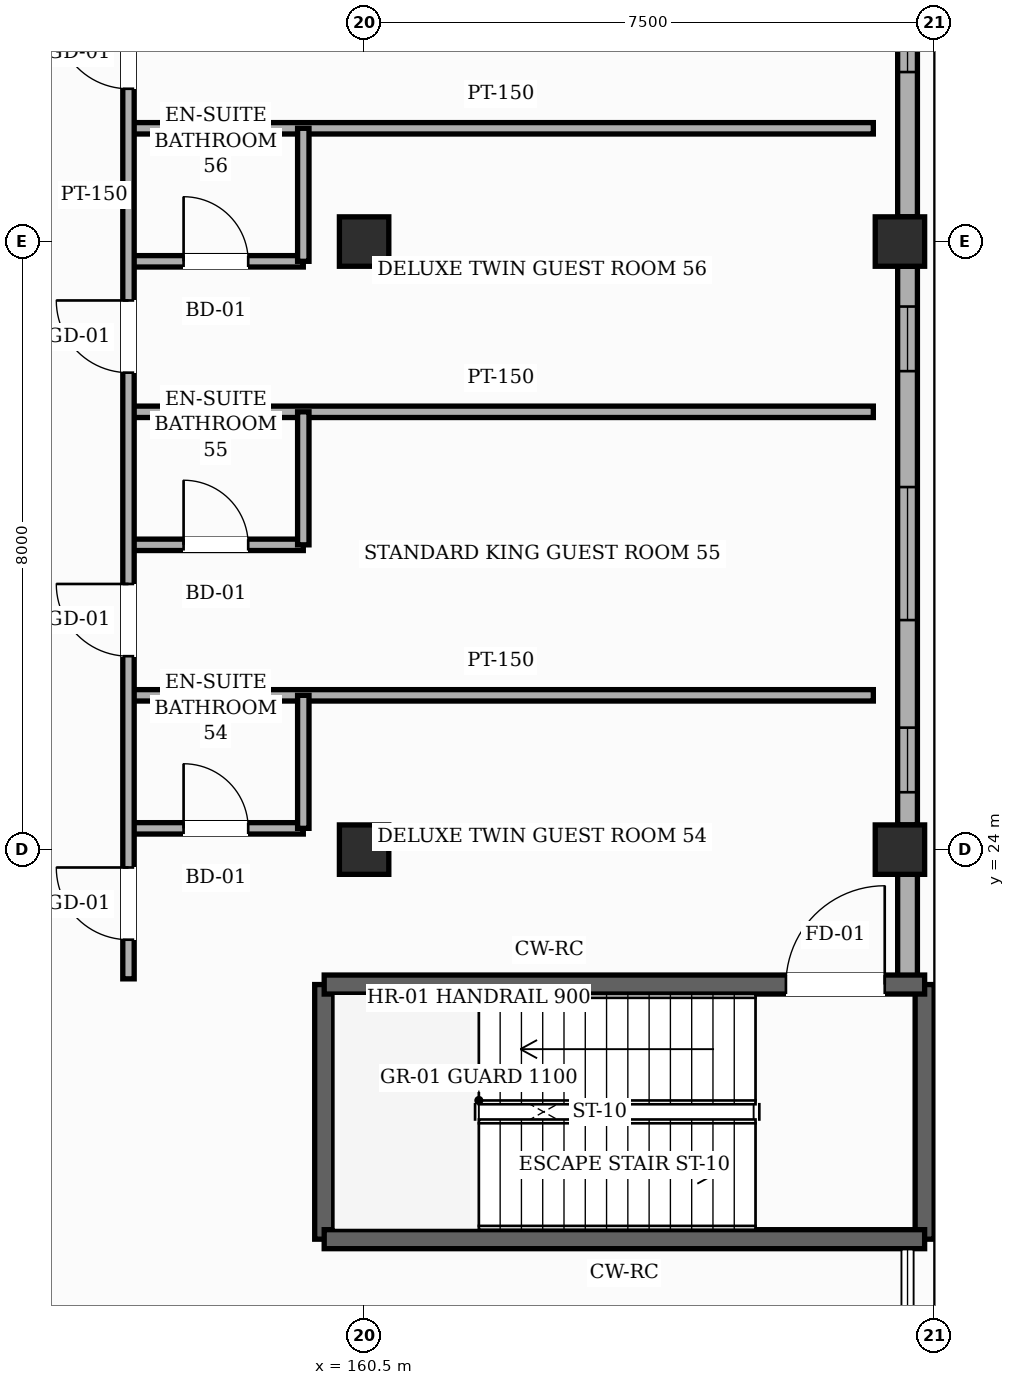
"""IFC4 building model, lengths in metres.
Left out: names, types, materials, properties, quantities, classifications, styles, units other than length and angle.
Written with IfcOpenShell. Run it as: python <this file> out.ifc"""

import sys

from ifc_helpers import new_model, si_unit, direction, frame, frame_2d, origin, origin_2d, place, context, subcontext, project, spatial, rectangle, hollow_rectangle, extrude, element, fill, save


model = new_model("IFC4")
c1 = context("Model", 3, precision=1e-05, world=origin(), true_north=direction((0.0, 1.0)))
c2 = subcontext(c1, "Body", "Model", "MODEL_VIEW")
j1 = project(units=[si_unit("LENGTHUNIT", "METRE"), si_unit("PLANEANGLEUNIT", "RADIAN")], contexts=[c1])
p1 = place(None, origin())
s1 = spatial("IfcSite", under=j1, at=p1, CompositionType="ELEMENT")
p2 = place(p1, origin())
s2 = spatial("IfcBuilding", under=s1, at=p2, CompositionType="ELEMENT")
p3 = place(p2, frame((0.0, 0.0, 19.8)))
s3 = spatial("IfcBuildingStorey", under=s2, at=p3, CompositionType="ELEMENT", Elevation=19.8)
for number, where, z_axis, x_axis in (
    (1, (160.5, 24.0, 0.0), (0.0, 0.0, 1.0), (1.0, 0.0, 0.0)),
    (2, (160.5, 32.0, 0.0), (0.0, 0.0, 1.0), (1.0, 0.0, 0.0)),
    (3, (167.55, 24.0, 0.0), (0.0, 0.0, 1.0), (1.0, 0.0, 0.0)),
    (4, (167.55, 32.0, 0.0), (0.0, 0.0, 1.0), (1.0, 0.0, 0.0)),
):
    element("IfcColumn", number, at=place(p3, frame(where, z_axis=z_axis, x_axis=x_axis)), inside=s3, PredefinedType="COLUMN", context=c2, shape_type="SweptSolid", body=[
        extrude(hollow_rectangle(XDim=0.65, YDim=0.65, WallThickness=0.025, InnerFilletRadius=0.025, OuterFilletRadius=0.05, at=origin_2d()), origin(), (0.0, 0.0, 1.0), 4.8),
    ])
p4 = place(p3, frame((167.65, 23.675, 0.0), z_axis=(0.0, 0.0, 1.0), x_axis=(0.0, -1.0, 0.0)))
e5 = element("IfcWall", 5, at=p4, inside=s3, PredefinedType="SOLIDWALL", context=c2, shape_type="SweptSolid", body=[
    extrude(rectangle(XDim=1.45, YDim=0.26, at=frame_2d((0.725, 0.0))), origin(), (0.0, 0.0, 1.0), 4.565),
])
p5 = place(p3, frame((167.65, 31.675, 0.0), z_axis=(0.0, 0.0, 1.0), x_axis=(0.0, -1.0, 0.0)))
e6 = element("IfcWall", 6, at=p5, inside=s3, PredefinedType="SOLIDWALL", context=c2, shape_type="SweptSolid", body=[
    extrude(rectangle(XDim=7.35, YDim=0.26, at=frame_2d((3.675, 0.0))), origin(), (0.0, 0.0, 1.0), 3.905),
])
p6 = place(p5, frame((6.07, 0.0, 0.85)))
e7 = element("IfcOpeningElement", 7, at=p6, cuts=e6, PredefinedType="OPENING", context=c2, shape_type="SweptSolid", body=[
    extrude(rectangle(XDim=0.85, YDim=1.35, at=frame_2d((0.425, 0.675))), frame((0.0, 0.14, 0.0), z_axis=(0.0, -1.0, 0.0), x_axis=(1.0, 0.0, 0.0)), (0.0, 0.0, 1.0), 0.28),
])
p7 = place(p5, frame((2.905, 0.0, 0.85)))
e8 = element("IfcOpeningElement", 8, at=p7, cuts=e6, PredefinedType="OPENING", context=c2, shape_type="SweptSolid", body=[
    extrude(rectangle(XDim=1.75, YDim=1.8, at=frame_2d((0.875, 0.9))), frame((0.0, 0.14, 0.0), z_axis=(0.0, -1.0, 0.0), x_axis=(1.0, 0.0, 0.0)), (0.0, 0.0, 1.0), 0.28),
])
p8 = place(p5, frame((0.53, 0.0, 0.85)))
e9 = element("IfcOpeningElement", 9, at=p8, cuts=e6, PredefinedType="OPENING", context=c2, shape_type="SweptSolid", body=[
    extrude(rectangle(XDim=0.85, YDim=1.35, at=frame_2d((0.425, 0.675))), frame((0.0, 0.14, 0.0), z_axis=(0.0, -1.0, 0.0), x_axis=(1.0, 0.0, 0.0)), (0.0, 0.0, 1.0), 0.28),
])
p9 = place(p3, frame((167.65, 40.575, 0.0), z_axis=(0.0, 0.0, 1.0), x_axis=(0.0, -1.0, 0.0)))
e10 = element("IfcWall", 10, at=p9, inside=s3, PredefinedType="SOLIDWALL", context=c2, shape_type="SweptSolid", body=[
    extrude(rectangle(XDim=8.25, YDim=0.26, at=frame_2d((4.125, 0.0))), origin(), (0.0, 0.0, 1.0), 3.905),
])
p10 = place(p9, frame((4.095, 0.0, 0.85)))
e11 = element("IfcOpeningElement", 11, at=p10, cuts=e10, PredefinedType="OPENING", context=c2, shape_type="SweptSolid", body=[
    extrude(rectangle(XDim=2.25, YDim=1.8, at=frame_2d((1.125, 0.9))), frame((0.0, 0.14, 0.0), z_axis=(0.0, -1.0, 0.0), x_axis=(1.0, 0.0, 0.0)), (0.0, 0.0, 1.0), 0.28),
])
p11 = place(p9, frame((1.05, 0.0, 0.85)))
e12 = element("IfcOpeningElement", 12, at=p11, cuts=e10, PredefinedType="OPENING", context=c2, shape_type="SweptSolid", body=[
    extrude(rectangle(XDim=1.25, YDim=1.95, at=frame_2d((0.625, 0.975))), frame((0.0, 0.14, 0.0), z_axis=(0.0, -1.0, 0.0), x_axis=(1.0, 0.0, 0.0)), (0.0, 0.0, 1.0), 0.28),
])
for number, where, z_axis, x_axis in (
    (13, (167.875, 22.225, 0.0), (0.0, 0.0, 1.0), (0.0, -1.0, 0.0)),
    (14, (159.975, 18.875, 0.0), (0.0, 0.0, 1.0), (0.0, 1.0, 0.0)),
):
    element("IfcWall", number, at=place(p3, frame(where, z_axis=z_axis, x_axis=x_axis)), inside=s3, PredefinedType="SHEAR", context=c2, shape_type="SweptSolid", body=[
        extrude(rectangle(XDim=3.35, YDim=0.25, at=frame_2d((1.675, 0.0))), origin(), (0.0, 0.0, 1.0), 4.58),
    ])
p12 = place(p3, frame((159.975, 22.225, 0.0), z_axis=(0.0, 0.0, 1.0), x_axis=(1.0, 0.0, 0.0)))
e15 = element("IfcWall", 15, at=p12, inside=s3, PredefinedType="SHEAR", context=c2, shape_type="SweptSolid", body=[
    extrude(rectangle(XDim=7.9, YDim=0.25, at=frame_2d((3.95, 0.0))), origin(), (0.0, 0.0, 1.0), 4.58),
])
p13 = place(p12, frame((6.075, 0.0, 0.0)))
e16 = element("IfcOpeningElement", 16, at=p13, cuts=e15, PredefinedType="OPENING", context=c2, shape_type="SweptSolid", body=[
    extrude(rectangle(XDim=1.3, YDim=2.2, at=frame_2d((0.65, 1.1))), frame((0.0, 0.135, 0.0), z_axis=(0.0, -1.0, 0.0), x_axis=(1.0, 0.0, 0.0)), (0.0, 0.0, 1.0), 0.27),
])
p14 = place(p3, frame((167.875, 18.875, 0.0), z_axis=(0.0, 0.0, 1.0), x_axis=(-1.0, 0.0, 0.0)))
e17 = element("IfcWall", 17, at=p14, inside=s3, PredefinedType="SHEAR", context=c2, shape_type="SweptSolid", body=[
    extrude(rectangle(XDim=7.9, YDim=0.25, at=frame_2d((3.95, 0.0))), origin(), (0.0, 0.0, 1.0), 4.58),
])
p15 = place(p3, frame((157.4, 24.28, 0.0), z_axis=(0.0, 0.0, 1.0), x_axis=(1.0, 0.0, 0.0)))
e18 = element("IfcWall", 18, at=p15, inside=s3, PredefinedType="PARTITIONING", context=c2, shape_type="SweptSolid", body=[
    extrude(rectangle(XDim=2.3, YDim=0.15, at=frame_2d((1.15, 0.0))), origin(), (0.0, 0.0, 1.0), 3.905),
])
p16 = place(p15, frame((0.725, 0.0, 0.0)))
e19 = element("IfcOpeningElement", 19, at=p16, cuts=e18, PredefinedType="OPENING", context=c2, shape_type="SweptSolid", body=[
    extrude(rectangle(XDim=0.85, YDim=2.1, at=frame_2d((0.425, 1.05))), frame((0.0, 0.085, 0.0), z_axis=(0.0, -1.0, 0.0), x_axis=(1.0, 0.0, 0.0)), (0.0, 0.0, 1.0), 0.17),
])
p17 = place(p3, frame((157.4, 26.03, 0.0), z_axis=(0.0, 0.0, 1.0), x_axis=(1.0, 0.0, 0.0)))
e20 = element("IfcWall", 20, at=p17, inside=s3, PredefinedType="PARTITIONING", context=c2, shape_type="SweptSolid", body=[
    extrude(rectangle(XDim=9.8, YDim=0.15, at=frame_2d((4.9, 0.0))), origin(), (0.0, 0.0, 1.0), 4.565),
])
p18 = place(p3, frame((157.4, 28.01, 0.0), z_axis=(0.0, 0.0, 1.0), x_axis=(1.0, 0.0, 0.0)))
e21 = element("IfcWall", 21, at=p18, inside=s3, PredefinedType="PARTITIONING", context=c2, shape_type="SweptSolid", body=[
    extrude(rectangle(XDim=2.3, YDim=0.15, at=frame_2d((1.15, 0.0))), origin(), (0.0, 0.0, 1.0), 4.205),
])
p19 = place(p18, frame((0.725, 0.0, 0.0)))
e22 = element("IfcOpeningElement", 22, at=p19, cuts=e21, PredefinedType="OPENING", context=c2, shape_type="SweptSolid", body=[
    extrude(rectangle(XDim=0.85, YDim=2.1, at=frame_2d((0.425, 1.05))), frame((0.0, 0.085, 0.0), z_axis=(0.0, -1.0, 0.0), x_axis=(1.0, 0.0, 0.0)), (0.0, 0.0, 1.0), 0.17),
])
p20 = place(p3, frame((157.4, 29.76, 0.0), z_axis=(0.0, 0.0, 1.0), x_axis=(1.0, 0.0, 0.0)))
e23 = element("IfcWall", 23, at=p20, inside=s3, PredefinedType="PARTITIONING", context=c2, shape_type="SweptSolid", body=[
    extrude(rectangle(XDim=9.8, YDim=0.15, at=frame_2d((4.9, 0.0))), origin(), (0.0, 0.0, 1.0), 4.565),
])
p21 = place(p3, frame((157.4, 31.74, 0.0), z_axis=(0.0, 0.0, 1.0), x_axis=(1.0, 0.0, 0.0)))
e24 = element("IfcWall", 24, at=p21, inside=s3, PredefinedType="PARTITIONING", context=c2, shape_type="SweptSolid", body=[
    extrude(rectangle(XDim=2.3, YDim=0.15, at=frame_2d((1.15, 0.0))), origin(), (0.0, 0.0, 1.0), 3.905),
])
p22 = place(p21, frame((0.725, 0.0, 0.0)))
e25 = element("IfcOpeningElement", 25, at=p22, cuts=e24, PredefinedType="OPENING", context=c2, shape_type="SweptSolid", body=[
    extrude(rectangle(XDim=0.85, YDim=2.1, at=frame_2d((0.425, 1.05))), frame((0.0, 0.085, 0.0), z_axis=(0.0, -1.0, 0.0), x_axis=(1.0, 0.0, 0.0)), (0.0, 0.0, 1.0), 0.17),
])
p23 = place(p3, frame((157.4, 33.49, 0.0), z_axis=(0.0, 0.0, 1.0), x_axis=(1.0, 0.0, 0.0)))
e26 = element("IfcWall", 26, at=p23, inside=s3, PredefinedType="PARTITIONING", context=c2, shape_type="SweptSolid", body=[
    extrude(rectangle(XDim=9.8, YDim=0.15, at=frame_2d((4.9, 0.0))), origin(), (0.0, 0.0, 1.0), 4.565),
])
p24 = place(p3, frame((157.4, 22.3, 0.0), z_axis=(0.0, 0.0, 1.0), x_axis=(0.0, 1.0, 0.0)))
e27 = element("IfcWall", 27, at=p24, inside=s3, PredefinedType="PARTITIONING", context=c2, shape_type="SweptSolid", body=[
    extrude(rectangle(XDim=48.5, YDim=0.15, at=frame_2d((24.25, 0.0))), origin(), (0.0, 0.0, 1.0), 4.565),
])
p25 = place(p24, frame((0.515, 0.0, 0.0)))
e28 = element("IfcOpeningElement", 28, at=p25, cuts=e27, PredefinedType="OPENING", context=c2, shape_type="SweptSolid", body=[
    extrude(rectangle(XDim=0.95, YDim=2.15, at=frame_2d((0.475, 1.075))), frame((0.0, 0.085, 0.0), z_axis=(0.0, -1.0, 0.0), x_axis=(1.0, 0.0, 0.0)), (0.0, 0.0, 1.0), 0.17),
])
p26 = place(p24, frame((4.245, 0.0, 0.0)))
e29 = element("IfcOpeningElement", 29, at=p26, cuts=e27, PredefinedType="OPENING", context=c2, shape_type="SweptSolid", body=[
    extrude(rectangle(XDim=0.95, YDim=2.15, at=frame_2d((0.475, 1.075))), frame((0.0, 0.085, 0.0), z_axis=(0.0, -1.0, 0.0), x_axis=(1.0, 0.0, 0.0)), (0.0, 0.0, 1.0), 0.17),
])
p27 = place(p24, frame((7.975, 0.0, 0.0)))
e30 = element("IfcOpeningElement", 30, at=p27, cuts=e27, PredefinedType="OPENING", context=c2, shape_type="SweptSolid", body=[
    extrude(rectangle(XDim=0.95, YDim=2.15, at=frame_2d((0.475, 1.075))), frame((0.0, 0.085, 0.0), z_axis=(0.0, -1.0, 0.0), x_axis=(1.0, 0.0, 0.0)), (0.0, 0.0, 1.0), 0.17),
])
p28 = place(p24, frame((11.71, 0.0, 0.0)))
e31 = element("IfcOpeningElement", 31, at=p28, cuts=e27, PredefinedType="OPENING", context=c2, shape_type="SweptSolid", body=[
    extrude(rectangle(XDim=0.95, YDim=2.15, at=frame_2d((0.475, 1.075))), frame((0.0, 0.085, 0.0), z_axis=(0.0, -1.0, 0.0), x_axis=(1.0, 0.0, 0.0)), (0.0, 0.0, 1.0), 0.17),
])
p29 = place(p24, frame((15.44, 0.0, 0.0)))
e32 = element("IfcOpeningElement", 32, at=p29, cuts=e27, PredefinedType="OPENING", context=c2, shape_type="SweptSolid", body=[
    extrude(rectangle(XDim=0.95, YDim=2.15, at=frame_2d((0.475, 1.075))), frame((0.0, 0.085, 0.0), z_axis=(0.0, -1.0, 0.0), x_axis=(1.0, 0.0, 0.0)), (0.0, 0.0, 1.0), 0.17),
])
p30 = place(p24, frame((19.17, 0.0, 0.0)))
e33 = element("IfcOpeningElement", 33, at=p30, cuts=e27, PredefinedType="OPENING", context=c2, shape_type="SweptSolid", body=[
    extrude(rectangle(XDim=0.95, YDim=2.15, at=frame_2d((0.475, 1.075))), frame((0.0, 0.085, 0.0), z_axis=(0.0, -1.0, 0.0), x_axis=(1.0, 0.0, 0.0)), (0.0, 0.0, 1.0), 0.17),
])
p31 = place(p24, frame((22.9, 0.0, 0.0)))
e34 = element("IfcOpeningElement", 34, at=p31, cuts=e27, PredefinedType="OPENING", context=c2, shape_type="SweptSolid", body=[
    extrude(rectangle(XDim=0.95, YDim=2.15, at=frame_2d((0.475, 1.075))), frame((0.0, 0.085, 0.0), z_axis=(0.0, -1.0, 0.0), x_axis=(1.0, 0.0, 0.0)), (0.0, 0.0, 1.0), 0.17),
])
p32 = place(p24, frame((26.63, 0.0, 0.0)))
e35 = element("IfcOpeningElement", 35, at=p32, cuts=e27, PredefinedType="OPENING", context=c2, shape_type="SweptSolid", body=[
    extrude(rectangle(XDim=0.95, YDim=2.15, at=frame_2d((0.475, 1.075))), frame((0.0, 0.085, 0.0), z_axis=(0.0, -1.0, 0.0), x_axis=(1.0, 0.0, 0.0)), (0.0, 0.0, 1.0), 0.17),
])
p33 = place(p24, frame((30.36, 0.0, 0.0)))
e36 = element("IfcOpeningElement", 36, at=p33, cuts=e27, PredefinedType="OPENING", context=c2, shape_type="SweptSolid", body=[
    extrude(rectangle(XDim=0.95, YDim=2.15, at=frame_2d((0.475, 1.075))), frame((0.0, 0.085, 0.0), z_axis=(0.0, -1.0, 0.0), x_axis=(1.0, 0.0, 0.0)), (0.0, 0.0, 1.0), 0.17),
])
p34 = place(p24, frame((34.09, 0.0, 0.0)))
e37 = element("IfcOpeningElement", 37, at=p34, cuts=e27, PredefinedType="OPENING", context=c2, shape_type="SweptSolid", body=[
    extrude(rectangle(XDim=0.95, YDim=2.15, at=frame_2d((0.475, 1.075))), frame((0.0, 0.085, 0.0), z_axis=(0.0, -1.0, 0.0), x_axis=(1.0, 0.0, 0.0)), (0.0, 0.0, 1.0), 0.17),
])
p35 = place(p24, frame((37.825, 0.0, 0.0)))
e38 = element("IfcOpeningElement", 38, at=p35, cuts=e27, PredefinedType="OPENING", context=c2, shape_type="SweptSolid", body=[
    extrude(rectangle(XDim=0.95, YDim=2.15, at=frame_2d((0.475, 1.075))), frame((0.0, 0.085, 0.0), z_axis=(0.0, -1.0, 0.0), x_axis=(1.0, 0.0, 0.0)), (0.0, 0.0, 1.0), 0.17),
])
p36 = place(p24, frame((41.555, 0.0, 0.0)))
e39 = element("IfcOpeningElement", 39, at=p36, cuts=e27, PredefinedType="OPENING", context=c2, shape_type="SweptSolid", body=[
    extrude(rectangle(XDim=0.95, YDim=2.15, at=frame_2d((0.475, 1.075))), frame((0.0, 0.085, 0.0), z_axis=(0.0, -1.0, 0.0), x_axis=(1.0, 0.0, 0.0)), (0.0, 0.0, 1.0), 0.17),
])
p37 = place(p24, frame((45.285, 0.0, 0.0)))
e40 = element("IfcOpeningElement", 40, at=p37, cuts=e27, PredefinedType="OPENING", context=c2, shape_type="SweptSolid", body=[
    extrude(rectangle(XDim=0.95, YDim=2.15, at=frame_2d((0.475, 1.075))), frame((0.0, 0.085, 0.0), z_axis=(0.0, -1.0, 0.0), x_axis=(1.0, 0.0, 0.0)), (0.0, 0.0, 1.0), 0.17),
])
for number, where, z_axis, x_axis in (
    (41, (159.7, 24.28, 0.0), (0.0, 0.0, 1.0), (0.0, 1.0, 0.0)),
    (42, (159.7, 28.01, 0.0), (0.0, 0.0, 1.0), (0.0, 1.0, 0.0)),
    (43, (159.7, 31.74, 0.0), (0.0, 0.0, 1.0), (0.0, 1.0, 0.0)),
):
    element("IfcWall", number, at=place(p3, frame(where, z_axis=z_axis, x_axis=x_axis)), inside=s3, PredefinedType="PARTITIONING", context=c2, shape_type="SweptSolid", body=[
        extrude(rectangle(XDim=1.75, YDim=0.15, at=frame_2d((0.875, 0.0))), origin(), (0.0, 0.0, 1.0), 4.565),
    ])
p38 = place(p6, origin())
e44 = element("IfcWindow", 44, at=p38, inside=s3, PartitioningType="SINGLE_PANEL", PredefinedType="WINDOW", context=c2, shape_type="SweptSolid", body=[
    extrude(rectangle(XDim=0.85, YDim=1.35, at=frame_2d((0.425, 0.675))), frame((0.0, 0.03, 0.0), z_axis=(0.0, -1.0, 0.0), x_axis=(1.0, 0.0, 0.0)), (0.0, 0.0, 1.0), 0.06),
])
fill(e7, e44)
p39 = place(p7, origin())
e45 = element("IfcWindow", 45, at=p39, inside=s3, PartitioningType="SINGLE_PANEL", PredefinedType="WINDOW", context=c2, shape_type="SweptSolid", body=[
    extrude(rectangle(XDim=1.75, YDim=1.8, at=frame_2d((0.875, 0.9))), frame((0.0, 0.03, 0.0), z_axis=(0.0, -1.0, 0.0), x_axis=(1.0, 0.0, 0.0)), (0.0, 0.0, 1.0), 0.06),
])
fill(e8, e45)
p40 = place(p8, origin())
e46 = element("IfcWindow", 46, at=p40, inside=s3, PartitioningType="SINGLE_PANEL", PredefinedType="WINDOW", context=c2, shape_type="SweptSolid", body=[
    extrude(rectangle(XDim=0.85, YDim=1.35, at=frame_2d((0.425, 0.675))), frame((0.0, 0.03, 0.0), z_axis=(0.0, -1.0, 0.0), x_axis=(1.0, 0.0, 0.0)), (0.0, 0.0, 1.0), 0.06),
])
fill(e9, e46)
p41 = place(p10, origin())
e47 = element("IfcWindow", 47, at=p41, inside=s3, PartitioningType="SINGLE_PANEL", PredefinedType="WINDOW", context=c2, shape_type="SweptSolid", body=[
    extrude(rectangle(XDim=2.25, YDim=1.8, at=frame_2d((1.125, 0.9))), frame((0.0, 0.03, 0.0), z_axis=(0.0, -1.0, 0.0), x_axis=(1.0, 0.0, 0.0)), (0.0, 0.0, 1.0), 0.06),
])
fill(e11, e47)
p42 = place(p13, origin())
e48 = element("IfcDoor", 48, at=p42, inside=s3, OperationType="SINGLE_SWING_RIGHT", PredefinedType="DOOR", context=c2, shape_type="SweptSolid", body=[
    extrude(rectangle(XDim=1.3, YDim=2.2, at=frame_2d((0.65, 1.1))), frame((0.0, 0.025, 0.0), z_axis=(0.0, -1.0, 0.0), x_axis=(1.0, 0.0, 0.0)), (0.0, 0.0, 1.0), 0.05),
])
fill(e16, e48)
p43 = place(p25, origin())
e49 = element("IfcDoor", 49, at=p43, inside=s3, OperationType="SINGLE_SWING_RIGHT", PredefinedType="DOOR", context=c2, shape_type="SweptSolid", body=[
    extrude(rectangle(XDim=0.95, YDim=2.15, at=frame_2d((0.475, 1.075))), frame((0.0, 0.025, 0.0), z_axis=(0.0, -1.0, 0.0), x_axis=(1.0, 0.0, 0.0)), (0.0, 0.0, 1.0), 0.05),
])
fill(e28, e49)
p44 = place(p16, origin())
e50 = element("IfcDoor", 50, at=p44, inside=s3, OperationType="SINGLE_SWING_LEFT", PredefinedType="DOOR", context=c2, shape_type="SweptSolid", body=[
    extrude(rectangle(XDim=0.85, YDim=2.1, at=frame_2d((0.425, 1.05))), frame((0.0, 0.025, 0.0), z_axis=(0.0, -1.0, 0.0), x_axis=(1.0, 0.0, 0.0)), (0.0, 0.0, 1.0), 0.05),
])
fill(e19, e50)
p45 = place(p26, origin())
e51 = element("IfcDoor", 51, at=p45, inside=s3, OperationType="SINGLE_SWING_RIGHT", PredefinedType="DOOR", context=c2, shape_type="SweptSolid", body=[
    extrude(rectangle(XDim=0.95, YDim=2.15, at=frame_2d((0.475, 1.075))), frame((0.0, 0.025, 0.0), z_axis=(0.0, -1.0, 0.0), x_axis=(1.0, 0.0, 0.0)), (0.0, 0.0, 1.0), 0.05),
])
fill(e29, e51)
p46 = place(p19, origin())
e52 = element("IfcDoor", 52, at=p46, inside=s3, OperationType="SINGLE_SWING_LEFT", PredefinedType="DOOR", context=c2, shape_type="SweptSolid", body=[
    extrude(rectangle(XDim=0.85, YDim=2.1, at=frame_2d((0.425, 1.05))), frame((0.0, 0.025, 0.0), z_axis=(0.0, -1.0, 0.0), x_axis=(1.0, 0.0, 0.0)), (0.0, 0.0, 1.0), 0.05),
])
fill(e22, e52)
p47 = place(p27, origin())
e53 = element("IfcDoor", 53, at=p47, inside=s3, OperationType="SINGLE_SWING_RIGHT", PredefinedType="DOOR", context=c2, shape_type="SweptSolid", body=[
    extrude(rectangle(XDim=0.95, YDim=2.15, at=frame_2d((0.475, 1.075))), frame((0.0, 0.025, 0.0), z_axis=(0.0, -1.0, 0.0), x_axis=(1.0, 0.0, 0.0)), (0.0, 0.0, 1.0), 0.05),
])
fill(e30, e53)
p48 = place(p22, origin())
e54 = element("IfcDoor", 54, at=p48, inside=s3, OperationType="SINGLE_SWING_LEFT", PredefinedType="DOOR", context=c2, shape_type="SweptSolid", body=[
    extrude(rectangle(XDim=0.85, YDim=2.1, at=frame_2d((0.425, 1.05))), frame((0.0, 0.025, 0.0), z_axis=(0.0, -1.0, 0.0), x_axis=(1.0, 0.0, 0.0)), (0.0, 0.0, 1.0), 0.05),
])
fill(e25, e54)
p49 = place(p28, origin())
e55 = element("IfcDoor", 55, at=p49, inside=s3, OperationType="SINGLE_SWING_RIGHT", PredefinedType="DOOR", context=c2, shape_type="SweptSolid", body=[
    extrude(rectangle(XDim=0.95, YDim=2.15, at=frame_2d((0.475, 1.075))), frame((0.0, 0.025, 0.0), z_axis=(0.0, -1.0, 0.0), x_axis=(1.0, 0.0, 0.0)), (0.0, 0.0, 1.0), 0.05),
])
fill(e31, e55)
save(model, sys.argv[1])
